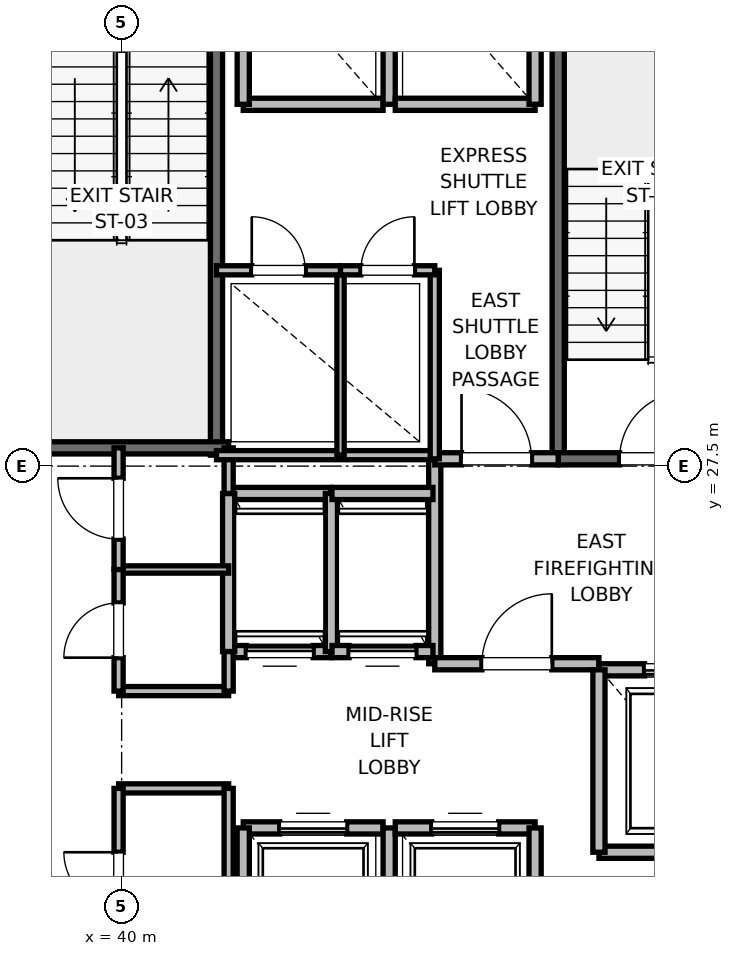
"""IFC4 building model, lengths in metres.
Left out: names, types, materials, properties, quantities, classifications, styles, units other than length and angle.
Written with IfcOpenShell. Run it as: python <this file> out.ifc"""

import sys

from ifc_helpers import new_model, si_unit, direction, frame, frame_2d, origin, place, context, subcontext, project, spatial, rectangle, extrude, element, fill, save


model = new_model("IFC4")
c1 = context("Model", 3, precision=1e-05, world=origin(), true_north=direction((0.0, 1.0)))
c2 = subcontext(c1, "Body", "Model", "MODEL_VIEW")
j1 = project(units=[si_unit("LENGTHUNIT", "METRE"), si_unit("PLANEANGLEUNIT", "RADIAN")], contexts=[c1])
p1 = place(None, origin())
s1 = spatial("IfcSite", under=j1, at=p1, CompositionType="ELEMENT")
p2 = place(p1, origin())
s2 = spatial("IfcBuilding", under=s1, at=p2, CompositionType="ELEMENT")
p3 = place(p2, frame((0.0, 0.0, 172.4)))
s3 = spatial("IfcBuildingStorey", under=s2, at=p3, CompositionType="ELEMENT", Elevation=172.4)
p4 = place(p3, frame((47.18, 27.62, 0.0), z_axis=(0.0, 0.0, 1.0), x_axis=(0.0, 1.0, 0.0)))
e1 = element("IfcWall", 1, at=p4, inside=s3, PredefinedType="SOLIDWALL", context=c2, shape_type="SweptSolid", body=[
    extrude(rectangle(XDim=8.18, YDim=0.2, at=frame_2d((4.09, 0.0))), origin(), (0.0, 0.0, 1.0), 3.775),
])
p5 = place(p3, frame((47.18, 27.62, 0.0), z_axis=(0.0, 0.0, 1.0), x_axis=(1.0, 0.0, 0.0)))
e2 = element("IfcWall", 2, at=p5, inside=s3, PredefinedType="SOLIDWALL", context=c2, shape_type="SweptSolid", body=[
    extrude(rectangle(XDim=3.12, YDim=0.2, at=frame_2d((1.56, 0.0))), origin(), (0.0, 0.0, 1.0), 3.775),
])
p6 = place(p5, frame((1.01, 0.0, 0.0)))
e3 = element("IfcOpeningElement", 3, at=p6, cuts=e2, PredefinedType="OPENING", context=c2, shape_type="SweptSolid", body=[
    extrude(rectangle(XDim=1.1, YDim=2.15, at=frame_2d((0.55, 1.075))), frame((0.0, 0.1, 0.0), z_axis=(0.0, -1.0, 0.0), x_axis=(1.0, 0.0, 0.0)), (0.0, 0.0, 1.0), 0.2),
])
p7 = place(p3, frame((41.56, 27.68, 0.0), z_axis=(0.0, 0.0, 1.0), x_axis=(0.0, 1.0, 0.0)))
e4 = element("IfcWall", 4, at=p7, inside=s3, PredefinedType="SOLIDWALL", context=c2, shape_type="SweptSolid", body=[
    extrude(rectangle(XDim=8.57, YDim=0.2, at=frame_2d((4.285, 0.0))), origin(), (0.0, 0.0, 1.0), 3.775),
])
p8 = place(p3, frame((38.44, 27.8, 0.0), z_axis=(0.0, 0.0, 1.0), x_axis=(1.0, 0.0, 0.0)))
e5 = element("IfcWall", 5, at=p8, inside=s3, PredefinedType="SOLIDWALL", context=c2, shape_type="SweptSolid", body=[
    extrude(rectangle(XDim=3.32, YDim=0.2, at=frame_2d((1.66, 0.0))), origin(), (0.0, 0.0, 1.0), 3.775),
])
p9 = place(p3, frame((45.15, 24.25, 0.0), z_axis=(0.0, 0.0, 1.0), x_axis=(0.0, 1.0, 0.0)))
e6 = element("IfcWall", 6, at=p9, inside=s3, PredefinedType="PARTITIONING", context=c2, shape_type="SweptSolid", body=[
    extrude(rectangle(XDim=3.37, YDim=0.2, at=frame_2d((1.685, 0.0))), origin(), (0.0, 0.0, 1.0), 3.775),
])
p10 = place(p3, frame((45.15, 24.25, 0.0), z_axis=(0.0, 0.0, 1.0), x_axis=(1.0, 0.0, 0.0)))
e7 = element("IfcWall", 7, at=p10, inside=s3, PredefinedType="PARTITIONING", context=c2, shape_type="SweptSolid", body=[
    extrude(rectangle(XDim=2.7, YDim=0.2, at=frame_2d((1.35, 0.0))), origin(), (0.0, 0.0, 1.0), 3.775),
])
p11 = place(p10, frame((0.775, 0.0, 0.0)))
e8 = element("IfcOpeningElement", 8, at=p11, cuts=e7, PredefinedType="OPENING", context=c2, shape_type="SweptSolid", body=[
    extrude(rectangle(XDim=1.15, YDim=2.2, at=frame_2d((0.575, 1.1))), frame((0.0, 0.1, 0.0), z_axis=(0.0, -1.0, 0.0), x_axis=(1.0, 0.0, 0.0)), (0.0, 0.0, 1.0), 0.2),
])
p12 = place(p3, frame((45.15, 27.62, 0.0), z_axis=(0.0, 0.0, 1.0), x_axis=(1.0, 0.0, 0.0)))
e9 = element("IfcWall", 9, at=p12, inside=s3, PredefinedType="PARTITIONING", context=c2, shape_type="SweptSolid", body=[
    extrude(rectangle(XDim=2.03, YDim=0.2, at=frame_2d((1.015, 0.0))), origin(), (0.0, 0.0, 1.0), 3.775),
])
p13 = place(p12, frame((0.44, 0.0, 0.0)))
e10 = element("IfcOpeningElement", 10, at=p13, cuts=e9, PredefinedType="OPENING", context=c2, shape_type="SweptSolid", body=[
    extrude(rectangle(XDim=1.15, YDim=2.2, at=frame_2d((0.575, 1.1))), frame((0.0, 0.1, 0.0), z_axis=(0.0, -1.0, 0.0), x_axis=(1.0, 0.0, 0.0)), (0.0, 0.0, 1.0), 0.2),
])
p14 = place(p3, frame((47.85, 21.15, 0.0), z_axis=(0.0, 0.0, 1.0), x_axis=(1.0, 0.0, 0.0)))
e11 = element("IfcWall", 11, at=p14, inside=s3, PredefinedType="SOLIDWALL", context=c2, shape_type="SweptSolid", body=[
    extrude(rectangle(XDim=2.6, YDim=0.2, at=frame_2d((1.3, 0.0))), origin(), (0.0, 0.0, 1.0), 3.775),
])
p15 = place(p3, frame((50.45, 24.15, 0.0), z_axis=(0.0, 0.0, 1.0), x_axis=(-1.0, 0.0, 0.0)))
e12 = element("IfcWall", 12, at=p15, inside=s3, PredefinedType="SOLIDWALL", context=c2, shape_type="SweptSolid", body=[
    extrude(rectangle(XDim=2.6, YDim=0.2, at=frame_2d((1.3, 0.0))), origin(), (0.0, 0.0, 1.0), 2.755),
])
p16 = place(p15, frame((0.75, 0.0, 0.0)))
e13 = element("IfcOpeningElement", 13, at=p16, cuts=e12, PredefinedType="OPENING", context=c2, shape_type="SweptSolid", body=[
    extrude(rectangle(XDim=1.1, YDim=2.2, at=frame_2d((0.55, 1.1))), frame((0.0, 0.1, 0.0), z_axis=(0.0, -1.0, 0.0), x_axis=(1.0, 0.0, 0.0)), (0.0, 0.0, 1.0), 0.2),
])
p17 = place(p3, frame((47.85, 24.15, 0.0), z_axis=(0.0, 0.0, 1.0), x_axis=(0.0, -1.0, 0.0)))
e14 = element("IfcWall", 14, at=p17, inside=s3, PredefinedType="SOLIDWALL", context=c2, shape_type="SweptSolid", body=[
    extrude(rectangle(XDim=3.0, YDim=0.2, at=frame_2d((1.5, 0.0))), origin(), (0.0, 0.0, 1.0), 3.775),
])
p18 = place(p3, frame((44.3, 21.55, 0.0), z_axis=(0.0, 0.0, 1.0), x_axis=(-1.0, 0.0, 0.0)))
e15 = element("IfcWall", 15, at=p18, inside=s3, PredefinedType="SOLIDWALL", context=c2, shape_type="SweptSolid", body=[
    extrude(rectangle(XDim=2.3, YDim=0.2, at=frame_2d((1.15, 0.0))), origin(), (0.0, 0.0, 1.0), 3.775),
])
p19 = place(p18, frame((0.6, 0.0, 0.0)))
e16 = element("IfcOpeningElement", 16, at=p19, cuts=e15, PredefinedType="OPENING", context=c2, shape_type="SweptSolid", body=[
    extrude(rectangle(XDim=1.1, YDim=2.2, at=frame_2d((0.55, 1.1))), frame((0.0, 0.1, 0.0), z_axis=(0.0, -1.0, 0.0), x_axis=(1.0, 0.0, 0.0)), (0.0, 0.0, 1.0), 0.2),
])
p20 = place(p3, frame((42.0, 21.55, 0.0), z_axis=(0.0, 0.0, 1.0), x_axis=(0.0, -1.0, 0.0)))
e17 = element("IfcWall", 17, at=p20, inside=s3, PredefinedType="SOLIDWALL", context=c2, shape_type="SweptSolid", body=[
    extrude(rectangle(XDim=2.6, YDim=0.2, at=frame_2d((1.3, 0.0))), origin(), (0.0, 0.0, 1.0), 2.755),
])
p21 = place(p3, frame((44.4, 18.95, 0.0), z_axis=(0.0, 0.0, 1.0), x_axis=(0.0, 1.0, 0.0)))
e18 = element("IfcWall", 18, at=p21, inside=s3, PredefinedType="SOLIDWALL", context=c2, shape_type="SweptSolid", body=[
    extrude(rectangle(XDim=2.6, YDim=0.2, at=frame_2d((1.3, 0.0))), origin(), (0.0, 0.0, 1.0), 3.775),
])
p22 = place(p3, frame((46.8, 21.55, 0.0), z_axis=(0.0, 0.0, 1.0), x_axis=(-1.0, 0.0, 0.0)))
e19 = element("IfcWall", 19, at=p22, inside=s3, PredefinedType="SOLIDWALL", context=c2, shape_type="SweptSolid", body=[
    extrude(rectangle(XDim=2.3, YDim=0.2, at=frame_2d((1.15, 0.0))), origin(), (0.0, 0.0, 1.0), 3.775),
])
p23 = place(p22, frame((0.6, 0.0, 0.0)))
e20 = element("IfcOpeningElement", 20, at=p23, cuts=e19, PredefinedType="OPENING", context=c2, shape_type="SweptSolid", body=[
    extrude(rectangle(XDim=1.1, YDim=2.2, at=frame_2d((0.55, 1.1))), frame((0.0, 0.1, 0.0), z_axis=(0.0, -1.0, 0.0), x_axis=(1.0, 0.0, 0.0)), (0.0, 0.0, 1.0), 0.2),
])
p24 = place(p3, frame((46.8, 18.95, 0.0), z_axis=(0.0, 0.0, 1.0), x_axis=(0.0, 1.0, 0.0)))
e21 = element("IfcWall", 21, at=p24, inside=s3, PredefinedType="SOLIDWALL", context=c2, shape_type="SweptSolid", body=[
    extrude(rectangle(XDim=2.6, YDim=0.2, at=frame_2d((1.3, 0.0))), origin(), (0.0, 0.0, 1.0), 3.775),
])
p25 = place(p3, frame((41.76, 24.45, 0.0), z_axis=(0.0, 0.0, 1.0), x_axis=(1.0, 0.0, 0.0)))
e22 = element("IfcWall", 22, at=p25, inside=s3, PredefinedType="SOLIDWALL", context=c2, shape_type="SweptSolid", body=[
    extrude(rectangle(XDim=1.68, YDim=0.2, at=frame_2d((0.84, 0.0))), origin(), (0.0, 0.0, 1.0), 3.775),
])
p26 = place(p25, frame((0.29, 0.0, 0.0)))
e23 = element("IfcOpeningElement", 23, at=p26, cuts=e22, PredefinedType="OPENING", context=c2, shape_type="SweptSolid", body=[
    extrude(rectangle(XDim=1.1, YDim=2.2, at=frame_2d((0.55, 1.1))), frame((0.0, 0.1, 0.0), z_axis=(0.0, -1.0, 0.0), x_axis=(1.0, 0.0, 0.0)), (0.0, 0.0, 1.0), 0.2),
])
p27 = place(p3, frame((43.44, 27.05, 0.0), z_axis=(0.0, 0.0, 1.0), x_axis=(-1.0, 0.0, 0.0)))
e24 = element("IfcWall", 24, at=p27, inside=s3, PredefinedType="SOLIDWALL", context=c2, shape_type="SweptSolid", body=[
    extrude(rectangle(XDim=1.68, YDim=0.2, at=frame_2d((0.84, 0.0))), origin(), (0.0, 0.0, 1.0), 3.775),
])
for number, where, z_axis, x_axis in (
    (25, (41.76, 27.05, 0.0), (0.0, 0.0, 1.0), (0.0, -1.0, 0.0)),
    (26, (43.45, 24.45, 0.0), (0.0, 0.0, 1.0), (0.0, 1.0, 0.0)),
):
    element("IfcWall", number, at=place(p3, frame(where, z_axis=z_axis, x_axis=x_axis)), inside=s3, PredefinedType="SOLIDWALL", context=c2, shape_type="SweptSolid", body=[
        extrude(rectangle(XDim=2.6, YDim=0.2, at=frame_2d((1.3, 0.0))), origin(), (0.0, 0.0, 1.0), 3.775),
    ])
p28 = place(p3, frame((43.46, 24.45, 0.0), z_axis=(0.0, 0.0, 1.0), x_axis=(1.0, 0.0, 0.0)))
e27 = element("IfcWall", 27, at=p28, inside=s3, PredefinedType="SOLIDWALL", context=c2, shape_type="SweptSolid", body=[
    extrude(rectangle(XDim=1.66, YDim=0.2, at=frame_2d((0.83, 0.0))), origin(), (0.0, 0.0, 1.0), 3.775),
])
p29 = place(p28, frame((0.28, 0.0, 0.0)))
e28 = element("IfcOpeningElement", 28, at=p29, cuts=e27, PredefinedType="OPENING", context=c2, shape_type="SweptSolid", body=[
    extrude(rectangle(XDim=1.1, YDim=2.2, at=frame_2d((0.55, 1.1))), frame((0.0, 0.1, 0.0), z_axis=(0.0, -1.0, 0.0), x_axis=(1.0, 0.0, 0.0)), (0.0, 0.0, 1.0), 0.2),
])
p30 = place(p3, frame((45.12, 27.05, 0.0), z_axis=(0.0, 0.0, 1.0), x_axis=(-1.0, 0.0, 0.0)))
e29 = element("IfcWall", 29, at=p30, inside=s3, PredefinedType="SOLIDWALL", context=c2, shape_type="SweptSolid", body=[
    extrude(rectangle(XDim=1.66, YDim=0.2, at=frame_2d((0.83, 0.0))), origin(), (0.0, 0.0, 1.0), 3.775),
])
p31 = place(p3, frame((42.0, 33.45, 0.0), z_axis=(0.0, 0.0, 1.0), x_axis=(1.0, 0.0, 0.0)))
e30 = element("IfcWall", 30, at=p31, inside=s3, PredefinedType="SOLIDWALL", context=c2, shape_type="SweptSolid", body=[
    extrude(rectangle(XDim=2.3, YDim=0.2, at=frame_2d((1.15, 0.0))), origin(), (0.0, 0.0, 1.0), 3.775),
])
for number, where, z_axis, x_axis in (
    (31, (42.0, 36.05, 0.0), (0.0, 0.0, 1.0), (0.0, -1.0, 0.0)),
    (32, (44.4, 33.45, 0.0), (0.0, 0.0, 1.0), (0.0, 1.0, 0.0)),
):
    element("IfcWall", number, at=place(p3, frame(where, z_axis=z_axis, x_axis=x_axis)), inside=s3, PredefinedType="SOLIDWALL", context=c2, shape_type="SweptSolid", body=[
        extrude(rectangle(XDim=2.6, YDim=0.2, at=frame_2d((1.3, 0.0))), origin(), (0.0, 0.0, 1.0), 2.755),
    ])
p32 = place(p3, frame((44.5, 33.45, 0.0), z_axis=(0.0, 0.0, 1.0), x_axis=(1.0, 0.0, 0.0)))
e33 = element("IfcWall", 33, at=p32, inside=s3, PredefinedType="SOLIDWALL", context=c2, shape_type="SweptSolid", body=[
    extrude(rectangle(XDim=2.3, YDim=0.2, at=frame_2d((1.15, 0.0))), origin(), (0.0, 0.0, 1.0), 3.775),
])
p33 = place(p3, frame((46.8, 33.45, 0.0), z_axis=(0.0, 0.0, 1.0), x_axis=(0.0, 1.0, 0.0)))
e34 = element("IfcWall", 34, at=p33, inside=s3, PredefinedType="SOLIDWALL", context=c2, shape_type="SweptSolid", body=[
    extrude(rectangle(XDim=2.6, YDim=0.2, at=frame_2d((1.3, 0.0))), origin(), (0.0, 0.0, 1.0), 3.775),
])
for number, where, z_axis, x_axis in (
    (35, (39.95, 22.2, 0.0), (0.0, 0.0, 1.0), (1.0, 0.0, 0.0)),
    (36, (39.95, 23.8, 0.0), (0.0, 0.0, 1.0), (1.0, 0.0, 0.0)),
):
    element("IfcWall", number, at=place(p3, frame(where, z_axis=z_axis, x_axis=x_axis)), inside=s3, PredefinedType="PARTITIONING", context=c2, shape_type="SweptSolid", body=[
        extrude(rectangle(XDim=1.81, YDim=0.15, at=frame_2d((0.905, 0.0))), origin(), (0.0, 0.0, 1.0), 2.85),
    ])
p34 = place(p3, frame((39.95, 25.8, 0.0), z_axis=(0.0, 0.0, 1.0), x_axis=(1.0, 0.0, 0.0)))
e37 = element("IfcWall", 37, at=p34, inside=s3, PredefinedType="PARTITIONING", context=c2, shape_type="SweptSolid", body=[
    extrude(rectangle(XDim=1.81, YDim=0.12, at=frame_2d((0.905, 0.0))), origin(), (0.0, 0.0, 1.0), 2.85),
])
p35 = place(p3, frame((41.76, 18.6, 0.0), z_axis=(0.0, 0.0, 1.0), x_axis=(0.0, 1.0, 0.0)))
e38 = element("IfcWall", 38, at=p35, inside=s3, PredefinedType="PARTITIONING", context=c2, shape_type="SweptSolid", body=[
    extrude(rectangle(XDim=3.6, YDim=0.15, at=frame_2d((1.8, 0.0))), origin(), (0.0, 0.0, 1.0), 2.755),
])
p36 = place(p3, frame((41.76, 23.8, 0.0), z_axis=(0.0, 0.0, 1.0), x_axis=(0.0, 1.0, 0.0)))
e39 = element("IfcWall", 39, at=p36, inside=s3, PredefinedType="PARTITIONING", context=c2, shape_type="SweptSolid", body=[
    extrude(rectangle(XDim=0.65, YDim=0.15, at=frame_2d((0.325, 0.0))), origin(), (0.0, 0.0, 1.0), 2.85),
])
p37 = place(p3, frame((41.76, 27.05, 0.0), z_axis=(0.0, 0.0, 1.0), x_axis=(0.0, 1.0, 0.0)))
e40 = element("IfcWall", 40, at=p37, inside=s3, PredefinedType="PARTITIONING", context=c2, shape_type="SweptSolid", body=[
    extrude(rectangle(XDim=0.75, YDim=0.15, at=frame_2d((0.375, 0.0))), origin(), (0.0, 0.0, 1.0), 2.85),
])
p38 = place(p3, frame((39.95, 19.2, 0.0), z_axis=(0.0, 0.0, 1.0), x_axis=(0.0, 1.0, 0.0)))
e41 = element("IfcWall", 41, at=p38, inside=s3, PredefinedType="PARTITIONING", context=c2, shape_type="SweptSolid", body=[
    extrude(rectangle(XDim=3.0, YDim=0.15, at=frame_2d((1.5, 0.0))), origin(), (0.0, 0.0, 1.0), 2.85),
])
p39 = place(p38, frame((1.05, 0.0, 0.0)))
e42 = element("IfcOpeningElement", 42, at=p39, cuts=e41, PredefinedType="OPENING", context=c2, shape_type="SweptSolid", body=[
    extrude(rectangle(XDim=0.9, YDim=2.1, at=frame_2d((0.45, 1.05))), frame((0.0, 0.075, 0.0), z_axis=(0.0, -1.0, 0.0), x_axis=(1.0, 0.0, 0.0)), (0.0, 0.0, 1.0), 0.15),
])
p40 = place(p3, frame((39.95, 23.8, 0.0), z_axis=(0.0, 0.0, 1.0), x_axis=(0.0, 1.0, 0.0)))
e43 = element("IfcWall", 43, at=p40, inside=s3, PredefinedType="PARTITIONING", context=c2, shape_type="SweptSolid", body=[
    extrude(rectangle(XDim=2.0, YDim=0.15, at=frame_2d((1.0, 0.0))), origin(), (0.0, 0.0, 1.0), 2.85),
])
p41 = place(p40, frame((0.55, 0.0, 0.0)))
e44 = element("IfcOpeningElement", 44, at=p41, cuts=e43, PredefinedType="OPENING", context=c2, shape_type="SweptSolid", body=[
    extrude(rectangle(XDim=0.9, YDim=2.1, at=frame_2d((0.45, 1.05))), frame((0.0, 0.075, 0.0), z_axis=(0.0, -1.0, 0.0), x_axis=(1.0, 0.0, 0.0)), (0.0, 0.0, 1.0), 0.15),
])
p42 = place(p3, frame((39.95, 25.8, 0.0), z_axis=(0.0, 0.0, 1.0), x_axis=(0.0, 1.0, 0.0)))
e45 = element("IfcWall", 45, at=p42, inside=s3, PredefinedType="PARTITIONING", context=c2, shape_type="SweptSolid", body=[
    extrude(rectangle(XDim=2.0, YDim=0.15, at=frame_2d((1.0, 0.0))), origin(), (0.0, 0.0, 1.0), 2.85),
])
p43 = place(p42, frame((0.5, 0.0, 0.0)))
e46 = element("IfcOpeningElement", 46, at=p43, cuts=e45, PredefinedType="OPENING", context=c2, shape_type="SweptSolid", body=[
    extrude(rectangle(XDim=1.0, YDim=2.15, at=frame_2d((0.5, 1.075))), frame((0.0, 0.075, 0.0), z_axis=(0.0, -1.0, 0.0), x_axis=(1.0, 0.0, 0.0)), (0.0, 0.0, 1.0), 0.15),
])
p44 = place(p3, frame((41.56, 27.68, 0.0), z_axis=(0.0, 0.0, 1.0), x_axis=(1.0, 0.0, 0.0)))
e47 = element("IfcWall", 47, at=p44, inside=s3, PredefinedType="PARTITIONING", context=c2, shape_type="SweptSolid", body=[
    extrude(rectangle(XDim=3.59, YDim=0.15, at=frame_2d((1.795, 0.0))), origin(), (0.0, 0.0, 1.0), 2.85),
])
p45 = place(p3, frame((45.15, 27.62, 0.0), z_axis=(0.0, 0.0, 1.0), x_axis=(0.0, 1.0, 0.0)))
e48 = element("IfcWall", 48, at=p45, inside=s3, PredefinedType="PARTITIONING", context=c2, shape_type="SweptSolid", body=[
    extrude(rectangle(XDim=3.1, YDim=0.15, at=frame_2d((1.55, 0.0))), origin(), (0.0, 0.0, 1.0), 2.85),
])
p46 = place(p3, frame((43.6, 27.68, 0.0), z_axis=(0.0, 0.0, 1.0), x_axis=(0.0, 1.0, 0.0)))
e49 = element("IfcWall", 49, at=p46, inside=s3, PredefinedType="PARTITIONING", context=c2, shape_type="SweptSolid", body=[
    extrude(rectangle(XDim=3.04, YDim=0.12, at=frame_2d((1.52, 0.0))), origin(), (0.0, 0.0, 1.0), 2.85),
])
p47 = place(p3, frame((41.56, 30.72, 0.0), z_axis=(0.0, 0.0, 1.0), x_axis=(1.0, 0.0, 0.0)))
e50 = element("IfcWall", 50, at=p47, inside=s3, PredefinedType="PARTITIONING", context=c2, shape_type="SweptSolid", body=[
    extrude(rectangle(XDim=2.04, YDim=0.15, at=frame_2d((1.02, 0.0))), origin(), (0.0, 0.0, 1.0), 2.85),
])
p48 = place(p47, frame((0.58, 0.0, 0.0)))
e51 = element("IfcOpeningElement", 51, at=p48, cuts=e50, PredefinedType="OPENING", context=c2, shape_type="SweptSolid", body=[
    extrude(rectangle(XDim=0.88, YDim=2.1, at=frame_2d((0.44, 1.05))), frame((0.0, 0.075, 0.0), z_axis=(0.0, -1.0, 0.0), x_axis=(1.0, 0.0, 0.0)), (0.0, 0.0, 1.0), 0.15),
])
p49 = place(p3, frame((43.6, 30.72, 0.0), z_axis=(0.0, 0.0, 1.0), x_axis=(1.0, 0.0, 0.0)))
e52 = element("IfcWall", 52, at=p49, inside=s3, PredefinedType="PARTITIONING", context=c2, shape_type="SweptSolid", body=[
    extrude(rectangle(XDim=1.55, YDim=0.15, at=frame_2d((0.775, 0.0))), origin(), (0.0, 0.0, 1.0), 2.85),
])
p50 = place(p49, frame((0.335, 0.0, 0.0)))
e53 = element("IfcOpeningElement", 53, at=p50, cuts=e52, PredefinedType="OPENING", context=c2, shape_type="SweptSolid", body=[
    extrude(rectangle(XDim=0.88, YDim=2.1, at=frame_2d((0.44, 1.05))), frame((0.0, 0.075, 0.0), z_axis=(0.0, -1.0, 0.0), x_axis=(1.0, 0.0, 0.0)), (0.0, 0.0, 1.0), 0.15),
])
p51 = place(p6, origin())
e54 = element("IfcDoor", 54, at=p51, inside=s3, OperationType="SINGLE_SWING_RIGHT", PredefinedType="DOOR", context=c2, shape_type="SweptSolid", body=[
    extrude(rectangle(XDim=1.1, YDim=2.15, at=frame_2d((0.55, 1.075))), frame((0.0, 0.025, 0.0), z_axis=(0.0, -1.0, 0.0), x_axis=(1.0, 0.0, 0.0)), (0.0, 0.0, 1.0), 0.05),
])
fill(e3, e54)
p52 = place(p11, origin())
e55 = element("IfcDoor", 55, at=p52, inside=s3, OperationType="SINGLE_SWING_RIGHT", PredefinedType="DOOR", context=c2, shape_type="SweptSolid", body=[
    extrude(rectangle(XDim=1.15, YDim=2.2, at=frame_2d((0.575, 1.1))), frame((0.0, 0.025, 0.0), z_axis=(0.0, -1.0, 0.0), x_axis=(1.0, 0.0, 0.0)), (0.0, 0.0, 1.0), 0.05),
])
fill(e8, e55)
p53 = place(p13, origin())
e56 = element("IfcDoor", 56, at=p53, inside=s3, OperationType="SINGLE_SWING_LEFT", PredefinedType="DOOR", context=c2, shape_type="SweptSolid", body=[
    extrude(rectangle(XDim=1.15, YDim=2.2, at=frame_2d((0.575, 1.1))), frame((0.0, 0.025, 0.0), z_axis=(0.0, -1.0, 0.0), x_axis=(1.0, 0.0, 0.0)), (0.0, 0.0, 1.0), 0.05),
])
fill(e10, e56)
p54 = place(p16, origin())
e57 = element("IfcDoor", 57, at=p54, inside=s3, OperationType="SLIDING_TO_RIGHT", PredefinedType="DOOR", context=c2, shape_type="SweptSolid", body=[
    extrude(rectangle(XDim=1.1, YDim=2.2, at=frame_2d((0.55, 1.1))), frame((0.0, 0.025, 0.0), z_axis=(0.0, -1.0, 0.0), x_axis=(1.0, 0.0, 0.0)), (0.0, 0.0, 1.0), 0.05),
])
fill(e13, e57)
p55 = place(p19, origin())
e58 = element("IfcDoor", 58, at=p55, inside=s3, OperationType="SLIDING_TO_RIGHT", PredefinedType="DOOR", context=c2, shape_type="SweptSolid", body=[
    extrude(rectangle(XDim=1.1, YDim=2.2, at=frame_2d((0.55, 1.1))), frame((0.0, 0.025, 0.0), z_axis=(0.0, -1.0, 0.0), x_axis=(1.0, 0.0, 0.0)), (0.0, 0.0, 1.0), 0.05),
])
fill(e16, e58)
p56 = place(p23, origin())
e59 = element("IfcDoor", 59, at=p56, inside=s3, OperationType="SLIDING_TO_RIGHT", PredefinedType="DOOR", context=c2, shape_type="SweptSolid", body=[
    extrude(rectangle(XDim=1.1, YDim=2.2, at=frame_2d((0.55, 1.1))), frame((0.0, 0.025, 0.0), z_axis=(0.0, -1.0, 0.0), x_axis=(1.0, 0.0, 0.0)), (0.0, 0.0, 1.0), 0.05),
])
fill(e20, e59)
p57 = place(p26, origin())
e60 = element("IfcDoor", 60, at=p57, inside=s3, OperationType="SLIDING_TO_RIGHT", PredefinedType="DOOR", context=c2, shape_type="SweptSolid", body=[
    extrude(rectangle(XDim=1.1, YDim=2.2, at=frame_2d((0.55, 1.1))), frame((0.0, 0.025, 0.0), z_axis=(0.0, -1.0, 0.0), x_axis=(1.0, 0.0, 0.0)), (0.0, 0.0, 1.0), 0.05),
])
fill(e23, e60)
p58 = place(p29, origin())
e61 = element("IfcDoor", 61, at=p58, inside=s3, OperationType="SLIDING_TO_RIGHT", PredefinedType="DOOR", context=c2, shape_type="SweptSolid", body=[
    extrude(rectangle(XDim=1.1, YDim=2.2, at=frame_2d((0.55, 1.1))), frame((0.0, 0.025, 0.0), z_axis=(0.0, -1.0, 0.0), x_axis=(1.0, 0.0, 0.0)), (0.0, 0.0, 1.0), 0.05),
])
fill(e28, e61)
p59 = place(p39, origin())
e62 = element("IfcDoor", 62, at=p59, inside=s3, OperationType="SINGLE_SWING_RIGHT", PredefinedType="DOOR", context=c2, shape_type="SweptSolid", body=[
    extrude(rectangle(XDim=0.9, YDim=2.1, at=frame_2d((0.45, 1.05))), frame((0.0, 0.025, 0.0), z_axis=(0.0, -1.0, 0.0), x_axis=(1.0, 0.0, 0.0)), (0.0, 0.0, 1.0), 0.05),
])
fill(e42, e62)
p60 = place(p41, origin())
e63 = element("IfcDoor", 63, at=p60, inside=s3, OperationType="SINGLE_SWING_LEFT", PredefinedType="DOOR", context=c2, shape_type="SweptSolid", body=[
    extrude(rectangle(XDim=0.9, YDim=2.1, at=frame_2d((0.45, 1.05))), frame((0.0, 0.025, 0.0), z_axis=(0.0, -1.0, 0.0), x_axis=(1.0, 0.0, 0.0)), (0.0, 0.0, 1.0), 0.05),
])
fill(e44, e63)
p61 = place(p43, origin())
e64 = element("IfcDoor", 64, at=p61, inside=s3, OperationType="SINGLE_SWING_RIGHT", PredefinedType="DOOR", context=c2, shape_type="SweptSolid", body=[
    extrude(rectangle(XDim=1.0, YDim=2.15, at=frame_2d((0.5, 1.075))), frame((0.0, 0.025, 0.0), z_axis=(0.0, -1.0, 0.0), x_axis=(1.0, 0.0, 0.0)), (0.0, 0.0, 1.0), 0.05),
])
fill(e46, e64)
p62 = place(p48, origin())
e65 = element("IfcDoor", 65, at=p62, inside=s3, OperationType="SINGLE_SWING_LEFT", PredefinedType="DOOR", context=c2, shape_type="SweptSolid", body=[
    extrude(rectangle(XDim=0.88, YDim=2.1, at=frame_2d((0.44, 1.05))), frame((0.0, 0.025, 0.0), z_axis=(0.0, -1.0, 0.0), x_axis=(1.0, 0.0, 0.0)), (0.0, 0.0, 1.0), 0.05),
])
fill(e51, e65)
p63 = place(p50, origin())
e66 = element("IfcDoor", 66, at=p63, inside=s3, OperationType="SINGLE_SWING_RIGHT", PredefinedType="DOOR", context=c2, shape_type="SweptSolid", body=[
    extrude(rectangle(XDim=0.88, YDim=2.1, at=frame_2d((0.44, 1.05))), frame((0.0, 0.025, 0.0), z_axis=(0.0, -1.0, 0.0), x_axis=(1.0, 0.0, 0.0)), (0.0, 0.0, 1.0), 0.05),
])
fill(e53, e66)
save(model, sys.argv[1])
